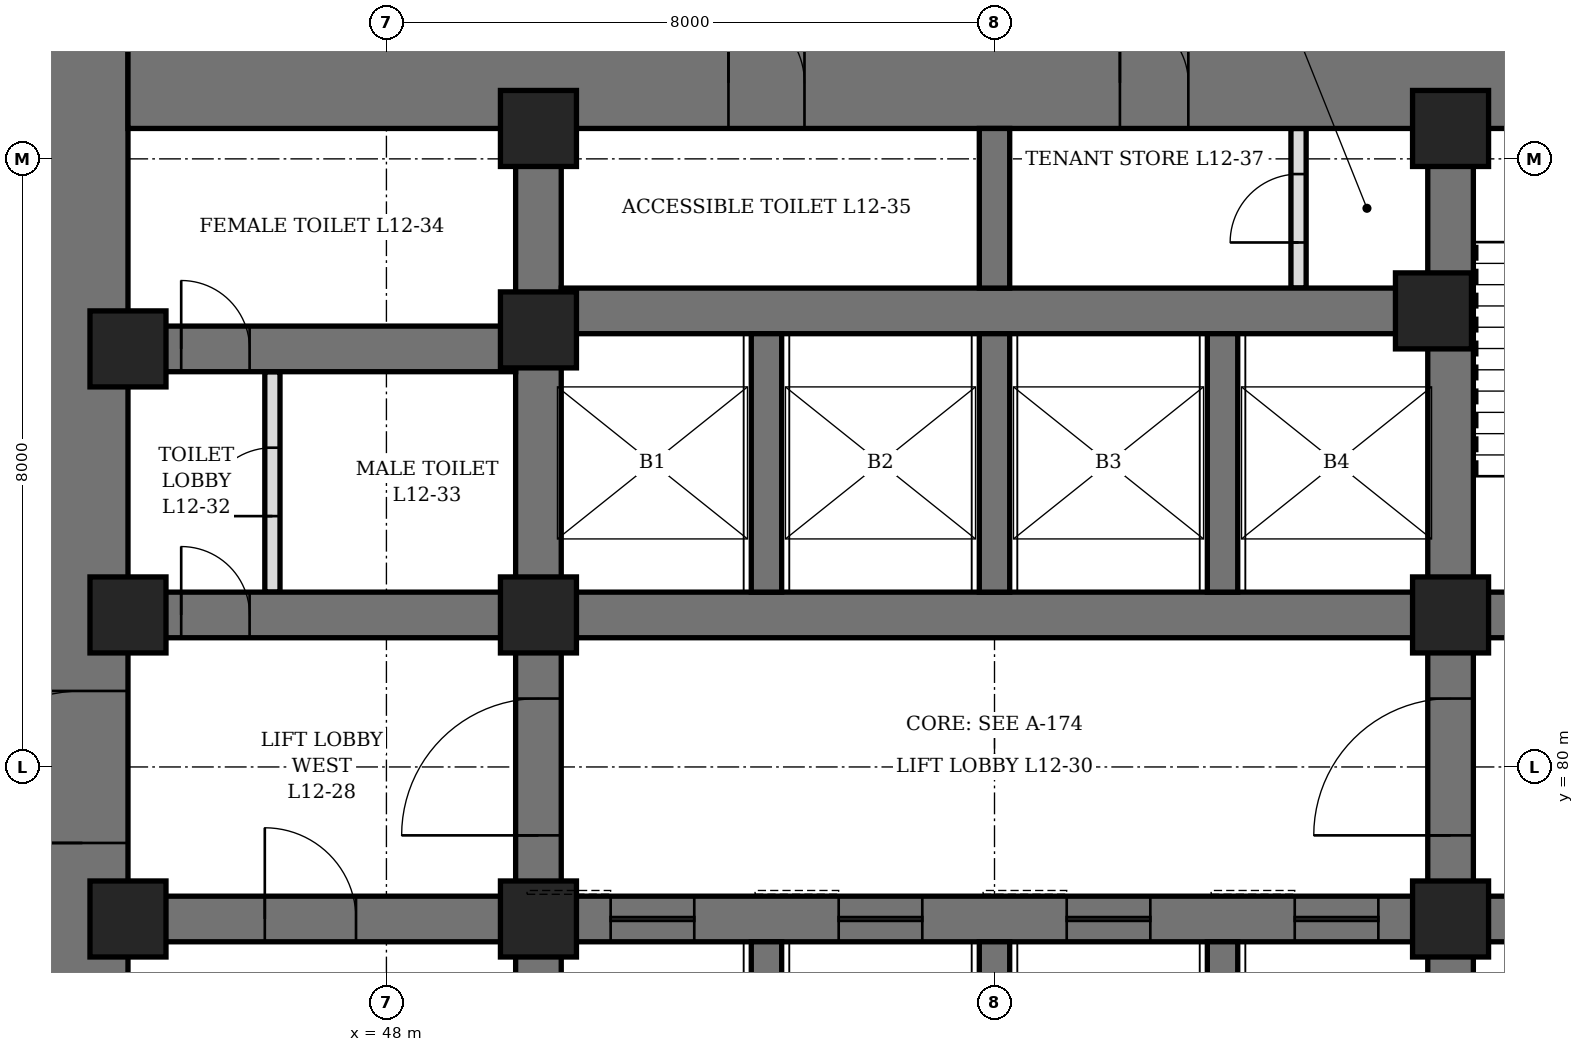
"""IFC4 building model, lengths in metres.
Left out: names, types, materials, properties, quantities, classifications, styles, units other than length and angle.
Written with IfcOpenShell. Run it as: python <this file> out.ifc"""

import sys

from ifc_helpers import new_model, si_unit, direction, frame, frame_2d, origin, origin_2d, place, context, subcontext, project, spatial, rectangle, hollow_rectangle, extrude, element, fill, save


model = new_model("IFC4")
c1 = context("Model", 3, precision=1e-05, world=origin(), true_north=direction((0.0, 1.0)))
c2 = subcontext(c1, "Body", "Model", "MODEL_VIEW")
j1 = project(units=[si_unit("LENGTHUNIT", "METRE"), si_unit("PLANEANGLEUNIT", "RADIAN")], contexts=[c1])
p1 = place(None, origin())
s1 = spatial("IfcSite", under=j1, at=p1, CompositionType="ELEMENT")
p2 = place(p1, origin())
s2 = spatial("IfcBuilding", under=s1, at=p2, CompositionType="ELEMENT")
p3 = place(p2, frame((0.0, 0.0, 60.1)))
s3 = spatial("IfcBuildingStorey", under=s2, at=p3, CompositionType="ELEMENT", Elevation=60.1)
p4 = place(p3, frame((44.0, 70.4, 0.0), z_axis=(0.0, 0.0, 1.0), x_axis=(0.0, 1.0, 0.0)))
e1 = element("IfcWall", 1, at=p4, inside=s3, PredefinedType="SHEAR", context=c2, shape_type="SweptSolid", body=[
    extrude(rectangle(XDim=19.2, YDim=1.2, at=frame_2d((9.6, 0.0))), origin(), (0.0, 0.0, 1.0), 4.2),
])
p5 = place(p4, frame((8.6, 0.0, 0.0)))
e2 = element("IfcOpeningElement", 2, at=p5, cuts=e1, PredefinedType="OPENING", context=c2, shape_type="SweptSolid", body=[
    extrude(rectangle(XDim=2.0, YDim=2.4, at=frame_2d((1.0, 1.2))), frame((0.0, 0.61, 0.0), z_axis=(0.0, -1.0, 0.0), x_axis=(1.0, 0.0, 0.0)), (0.0, 0.0, 1.0), 1.22),
])
p6 = place(p3, frame((44.6, 89.0, 0.0), z_axis=(0.0, 0.0, 1.0), x_axis=(1.0, 0.0, 0.0)))
e3 = element("IfcWall", 3, at=p6, inside=s3, PredefinedType="SHEAR", context=c2, shape_type="SweptSolid", body=[
    extrude(rectangle(XDim=22.8, YDim=1.2, at=frame_2d((11.4, 0.0))), origin(), (0.0, 0.0, 1.0), 4.2),
])
p7 = place(p6, frame((7.9, 0.0, 0.0)))
e4 = element("IfcOpeningElement", 4, at=p7, cuts=e3, PredefinedType="OPENING", context=c2, shape_type="SweptSolid", body=[
    extrude(rectangle(XDim=1.0, YDim=2.1, at=frame_2d((0.5, 1.05))), frame((0.0, 0.61, 0.0), z_axis=(0.0, -1.0, 0.0), x_axis=(1.0, 0.0, 0.0)), (0.0, 0.0, 1.0), 1.22),
])
p8 = place(p6, frame((13.05, 0.0, 0.0)))
e5 = element("IfcOpeningElement", 5, at=p8, cuts=e3, PredefinedType="OPENING", context=c2, shape_type="SweptSolid", body=[
    extrude(rectangle(XDim=0.9, YDim=2.1, at=frame_2d((0.45, 1.05))), frame((0.0, 0.61, 0.0), z_axis=(0.0, -1.0, 0.0), x_axis=(1.0, 0.0, 0.0)), (0.0, 0.0, 1.0), 1.22),
])
p9 = place(p3, frame((50.0, 71.6, 0.0), z_axis=(0.0, 0.0, 1.0), x_axis=(0.0, 1.0, 0.0)))
e6 = element("IfcWall", 6, at=p9, inside=s3, PredefinedType="SHEAR", context=c2, shape_type="SweptSolid", body=[
    extrude(rectangle(XDim=16.8, YDim=0.6, at=frame_2d((8.4, 0.0))), origin(), (0.0, 0.0, 1.0), 4.2),
])
p10 = place(p9, frame((7.5, 0.0, 0.0)))
e7 = element("IfcOpeningElement", 7, at=p10, cuts=e6, PredefinedType="OPENING", context=c2, shape_type="SweptSolid", body=[
    extrude(rectangle(XDim=1.8, YDim=2.4, at=frame_2d((0.9, 1.2))), frame((0.0, 0.31, 0.0), z_axis=(0.0, -1.0, 0.0), x_axis=(1.0, 0.0, 0.0)), (0.0, 0.0, 1.0), 0.62),
])
p11 = place(p3, frame((62.0, 71.6, 0.0), z_axis=(0.0, 0.0, 1.0), x_axis=(0.0, 1.0, 0.0)))
e8 = element("IfcWall", 8, at=p11, inside=s3, PredefinedType="SHEAR", context=c2, shape_type="SweptSolid", body=[
    extrude(rectangle(XDim=16.8, YDim=0.6, at=frame_2d((8.4, 0.0))), origin(), (0.0, 0.0, 1.0), 4.2),
])
p12 = place(p11, frame((7.5, 0.0, 0.0)))
e9 = element("IfcOpeningElement", 9, at=p12, cuts=e8, PredefinedType="OPENING", context=c2, shape_type="SweptSolid", body=[
    extrude(rectangle(XDim=1.8, YDim=2.4, at=frame_2d((0.9, 1.2))), frame((0.0, 0.31, 0.0), z_axis=(0.0, -1.0, 0.0), x_axis=(1.0, 0.0, 0.0)), (0.0, 0.0, 1.0), 0.62),
])
p13 = place(p3, frame((44.6, 78.0, 0.0), z_axis=(0.0, 0.0, 1.0), x_axis=(1.0, 0.0, 0.0)))
e10 = element("IfcWall", 10, at=p13, inside=s3, PredefinedType="SHEAR", context=c2, shape_type="SweptSolid", body=[
    extrude(rectangle(XDim=5.1, YDim=0.6, at=frame_2d((2.55, 0.0))), origin(), (0.0, 0.0, 1.0), 4.2),
])
p14 = place(p13, frame((1.8, 0.0, 0.0)))
e11 = element("IfcOpeningElement", 11, at=p14, cuts=e10, PredefinedType="OPENING", context=c2, shape_type="SweptSolid", body=[
    extrude(rectangle(XDim=1.2, YDim=2.1, at=frame_2d((0.6, 1.05))), frame((0.0, 0.31, 0.0), z_axis=(0.0, -1.0, 0.0), x_axis=(1.0, 0.0, 0.0)), (0.0, 0.0, 1.0), 0.62),
])
p15 = place(p3, frame((44.6, 82.0, 0.0), z_axis=(0.0, 0.0, 1.0), x_axis=(1.0, 0.0, 0.0)))
e12 = element("IfcWall", 12, at=p15, inside=s3, PredefinedType="SHEAR", context=c2, shape_type="SweptSolid", body=[
    extrude(rectangle(XDim=5.1, YDim=0.6, at=frame_2d((2.55, 0.0))), origin(), (0.0, 0.0, 1.0), 4.2),
])
p16 = place(p15, frame((0.7, 0.0, 0.0)))
e13 = element("IfcOpeningElement", 13, at=p16, cuts=e12, PredefinedType="OPENING", context=c2, shape_type="SweptSolid", body=[
    extrude(rectangle(XDim=0.9, YDim=2.1, at=frame_2d((0.45, 1.05))), frame((0.0, 0.31, 0.0), z_axis=(0.0, -1.0, 0.0), x_axis=(1.0, 0.0, 0.0)), (0.0, 0.0, 1.0), 0.62),
])
p17 = place(p3, frame((44.6, 85.5, 0.0), z_axis=(0.0, 0.0, 1.0), x_axis=(1.0, 0.0, 0.0)))
e14 = element("IfcWall", 14, at=p17, inside=s3, PredefinedType="SHEAR", context=c2, shape_type="SweptSolid", body=[
    extrude(rectangle(XDim=5.1, YDim=0.6, at=frame_2d((2.55, 0.0))), origin(), (0.0, 0.0, 1.0), 4.2),
])
p18 = place(p17, frame((0.7, 0.0, 0.0)))
e15 = element("IfcOpeningElement", 15, at=p18, cuts=e14, PredefinedType="OPENING", context=c2, shape_type="SweptSolid", body=[
    extrude(rectangle(XDim=0.9, YDim=2.1, at=frame_2d((0.45, 1.05))), frame((0.0, 0.31, 0.0), z_axis=(0.0, -1.0, 0.0), x_axis=(1.0, 0.0, 0.0)), (0.0, 0.0, 1.0), 0.62),
])
p19 = place(p3, frame((62.3, 78.0, 0.0), z_axis=(0.0, 0.0, 1.0), x_axis=(1.0, 0.0, 0.0)))
e16 = element("IfcWall", 16, at=p19, inside=s3, PredefinedType="SHEAR", context=c2, shape_type="SweptSolid", body=[
    extrude(rectangle(XDim=5.1, YDim=0.6, at=frame_2d((2.55, 0.0))), origin(), (0.0, 0.0, 1.0), 4.2),
])
p20 = place(p19, frame((2.1, 0.0, 0.0)))
e17 = element("IfcOpeningElement", 17, at=p20, cuts=e16, PredefinedType="OPENING", context=c2, shape_type="SweptSolid", body=[
    extrude(rectangle(XDim=1.2, YDim=2.1, at=frame_2d((0.6, 1.05))), frame((0.0, 0.31, 0.0), z_axis=(0.0, -1.0, 0.0), x_axis=(1.0, 0.0, 0.0)), (0.0, 0.0, 1.0), 0.62),
])
p21 = place(p3, frame((62.3, 82.0, 0.0), z_axis=(0.0, 0.0, 1.0), x_axis=(1.0, 0.0, 0.0)))
e18 = element("IfcWall", 18, at=p21, inside=s3, PredefinedType="SHEAR", context=c2, shape_type="SweptSolid", body=[
    extrude(rectangle(XDim=5.1, YDim=0.6, at=frame_2d((2.55, 0.0))), origin(), (0.0, 0.0, 1.0), 4.2),
])
p22 = place(p21, frame((2.1, 0.0, 0.0)))
e19 = element("IfcOpeningElement", 19, at=p22, cuts=e18, PredefinedType="OPENING", context=c2, shape_type="SweptSolid", body=[
    extrude(rectangle(XDim=1.2, YDim=2.1, at=frame_2d((0.6, 1.05))), frame((0.0, 0.31, 0.0), z_axis=(0.0, -1.0, 0.0), x_axis=(1.0, 0.0, 0.0)), (0.0, 0.0, 1.0), 0.62),
])
p23 = place(p3, frame((50.3, 78.0, 0.0), z_axis=(0.0, 0.0, 1.0), x_axis=(1.0, 0.0, 0.0)))
e20 = element("IfcWall", 20, at=p23, inside=s3, PredefinedType="SHEAR", context=c2, shape_type="SweptSolid", body=[
    extrude(rectangle(XDim=11.4, YDim=0.6, at=frame_2d((5.7, 0.0))), origin(), (0.0, 0.0, 1.0), 4.2),
])
p24 = place(p23, frame((0.65, 0.0, 0.0)))
e21 = element("IfcOpeningElement", 21, at=p24, cuts=e20, PredefinedType="OPENING", context=c2, shape_type="SweptSolid", body=[
    extrude(rectangle(XDim=1.1, YDim=2.2, at=frame_2d((0.55, 1.1))), frame((0.0, 0.31, 0.0), z_axis=(0.0, -1.0, 0.0), x_axis=(1.0, 0.0, 0.0)), (0.0, 0.0, 1.0), 0.62),
])
p25 = place(p23, frame((3.65, 0.0, 0.0)))
e22 = element("IfcOpeningElement", 22, at=p25, cuts=e20, PredefinedType="OPENING", context=c2, shape_type="SweptSolid", body=[
    extrude(rectangle(XDim=1.1, YDim=2.2, at=frame_2d((0.55, 1.1))), frame((0.0, 0.31, 0.0), z_axis=(0.0, -1.0, 0.0), x_axis=(1.0, 0.0, 0.0)), (0.0, 0.0, 1.0), 0.62),
])
p26 = place(p23, frame((6.65, 0.0, 0.0)))
e23 = element("IfcOpeningElement", 23, at=p26, cuts=e20, PredefinedType="OPENING", context=c2, shape_type="SweptSolid", body=[
    extrude(rectangle(XDim=1.1, YDim=2.2, at=frame_2d((0.55, 1.1))), frame((0.0, 0.31, 0.0), z_axis=(0.0, -1.0, 0.0), x_axis=(1.0, 0.0, 0.0)), (0.0, 0.0, 1.0), 0.62),
])
p27 = place(p23, frame((9.65, 0.0, 0.0)))
e24 = element("IfcOpeningElement", 24, at=p27, cuts=e20, PredefinedType="OPENING", context=c2, shape_type="SweptSolid", body=[
    extrude(rectangle(XDim=1.1, YDim=2.2, at=frame_2d((0.55, 1.1))), frame((0.0, 0.31, 0.0), z_axis=(0.0, -1.0, 0.0), x_axis=(1.0, 0.0, 0.0)), (0.0, 0.0, 1.0), 0.62),
])
for number, where, z_axis, x_axis in (
    (25, (50.3, 82.0, 0.0), (0.0, 0.0, 1.0), (1.0, 0.0, 0.0)),
    (26, (50.3, 86.0, 0.0), (0.0, 0.0, 1.0), (1.0, 0.0, 0.0)),
):
    element("IfcWall", number, at=place(p3, frame(where, z_axis=z_axis, x_axis=x_axis)), inside=s3, PredefinedType="SHEAR", context=c2, shape_type="SweptSolid", body=[
        extrude(rectangle(XDim=11.4, YDim=0.6, at=frame_2d((5.7, 0.0))), origin(), (0.0, 0.0, 1.0), 4.2),
    ])
p28 = place(p3, frame((53.0, 74.2, 0.0), z_axis=(0.0, 0.0, 1.0), x_axis=(0.0, 1.0, 0.0)))
e27 = element("IfcWall", 27, at=p28, inside=s3, PredefinedType="SHEAR", context=c2, shape_type="SweptSolid", body=[
    extrude(rectangle(XDim=3.5, YDim=0.4, at=frame_2d((1.75, 0.0))), origin(), (0.0, 0.0, 1.0), 4.2),
])
p29 = place(p3, frame((53.0, 82.3, 0.0), z_axis=(0.0, 0.0, 1.0), x_axis=(0.0, 1.0, 0.0)))
e28 = element("IfcWall", 28, at=p29, inside=s3, PredefinedType="SHEAR", context=c2, shape_type="SweptSolid", body=[
    extrude(rectangle(XDim=3.4, YDim=0.4, at=frame_2d((1.7, 0.0))), origin(), (0.0, 0.0, 1.0), 4.2),
])
p30 = place(p3, frame((56.0, 74.2, 0.0), z_axis=(0.0, 0.0, 1.0), x_axis=(0.0, 1.0, 0.0)))
e29 = element("IfcWall", 29, at=p30, inside=s3, PredefinedType="SHEAR", context=c2, shape_type="SweptSolid", body=[
    extrude(rectangle(XDim=3.5, YDim=0.4, at=frame_2d((1.75, 0.0))), origin(), (0.0, 0.0, 1.0), 4.2),
])
p31 = place(p3, frame((56.0, 82.3, 0.0), z_axis=(0.0, 0.0, 1.0), x_axis=(0.0, 1.0, 0.0)))
e30 = element("IfcWall", 30, at=p31, inside=s3, PredefinedType="SHEAR", context=c2, shape_type="SweptSolid", body=[
    extrude(rectangle(XDim=3.4, YDim=0.4, at=frame_2d((1.7, 0.0))), origin(), (0.0, 0.0, 1.0), 4.2),
])
p32 = place(p3, frame((59.0, 74.2, 0.0), z_axis=(0.0, 0.0, 1.0), x_axis=(0.0, 1.0, 0.0)))
e31 = element("IfcWall", 31, at=p32, inside=s3, PredefinedType="SHEAR", context=c2, shape_type="SweptSolid", body=[
    extrude(rectangle(XDim=3.5, YDim=0.4, at=frame_2d((1.75, 0.0))), origin(), (0.0, 0.0, 1.0), 4.2),
])
p33 = place(p3, frame((59.0, 82.3, 0.0), z_axis=(0.0, 0.0, 1.0), x_axis=(0.0, 1.0, 0.0)))
e32 = element("IfcWall", 32, at=p33, inside=s3, PredefinedType="SHEAR", context=c2, shape_type="SweptSolid", body=[
    extrude(rectangle(XDim=3.4, YDim=0.4, at=frame_2d((1.7, 0.0))), origin(), (0.0, 0.0, 1.0), 4.2),
])
p34 = place(p3, frame((56.0, 86.3, 0.0), z_axis=(0.0, 0.0, 1.0), x_axis=(0.0, 1.0, 0.0)))
e33 = element("IfcWall", 33, at=p34, inside=s3, PredefinedType="SHEAR", context=c2, shape_type="SweptSolid", body=[
    extrude(rectangle(XDim=2.1, YDim=0.4, at=frame_2d((1.05, 0.0))), origin(), (0.0, 0.0, 1.0), 4.2),
])
for number, where, z_axis, x_axis in (
    (34, (44.6, 78.0, 0.0), (0.0, 0.0, 1.0), (1.0, 0.0, 0.0)),
    (35, (44.6, 82.0, 0.0), (0.0, 0.0, 1.0), (1.0, 0.0, 0.0)),
    (36, (44.6, 85.5, 0.0), (0.0, 0.0, 1.0), (1.0, 0.0, 0.0)),
    (37, (50.0, 78.0, 0.0), (0.0, 0.0, 1.0), (1.0, 0.0, 0.0)),
    (38, (50.0, 82.0, 0.0), (0.0, 0.0, 1.0), (1.0, 0.0, 0.0)),
    (39, (50.0, 85.75, 0.0), (0.0, 0.0, 1.0), (1.0, 0.0, 0.0)),
    (40, (50.0, 88.4, 0.0), (0.0, 0.0, 1.0), (1.0, 0.0, 0.0)),
    (41, (61.775, 86.0, 0.0), (0.0, 0.0, 1.0), (1.0, 0.0, 0.0)),
    (42, (62.0, 78.0, 0.0), (0.0, 0.0, 1.0), (1.0, 0.0, 0.0)),
    (43, (62.0, 82.0, 0.0), (0.0, 0.0, 1.0), (1.0, 0.0, 0.0)),
    (44, (62.0, 88.4, 0.0), (0.0, 0.0, 1.0), (1.0, 0.0, 0.0)),
):
    element("IfcColumn", number, at=place(p3, frame(where, z_axis=z_axis, x_axis=x_axis)), inside=s3, PredefinedType="COLUMN", context=c2, shape_type="SweptSolid", body=[
        extrude(hollow_rectangle(XDim=1.0, YDim=1.0, WallThickness=0.15, at=origin_2d()), origin(), (0.0, 0.0, 1.0), 4.2),
    ])
p35 = place(p3, frame((46.5, 82.3, 0.0), z_axis=(0.0, 0.0, 1.0), x_axis=(0.0, 1.0, 0.0)))
e45 = element("IfcWall", 45, at=p35, inside=s3, PredefinedType="PARTITIONING", context=c2, shape_type="SweptSolid", body=[
    extrude(rectangle(XDim=2.9, YDim=0.2, at=frame_2d((1.45, 0.0))), origin(), (0.0, 0.0, 1.0), 4.04),
])
p36 = place(p35, frame((1.0, 0.0, 0.0)))
e46 = element("IfcOpeningElement", 46, at=p36, cuts=e45, PredefinedType="OPENING", context=c2, shape_type="SweptSolid", body=[
    extrude(rectangle(XDim=0.9, YDim=2.1, at=frame_2d((0.45, 1.05))), frame((0.0, 0.11, 0.0), z_axis=(0.0, -1.0, 0.0), x_axis=(1.0, 0.0, 0.0)), (0.0, 0.0, 1.0), 0.22),
])
p37 = place(p3, frame((60.0, 86.3, 0.0), z_axis=(0.0, 0.0, 1.0), x_axis=(0.0, 1.0, 0.0)))
e47 = element("IfcWall", 47, at=p37, inside=s3, PredefinedType="PARTITIONING", context=c2, shape_type="SweptSolid", body=[
    extrude(rectangle(XDim=2.1, YDim=0.2, at=frame_2d((1.05, 0.0))), origin(), (0.0, 0.0, 1.0), 4.04),
])
p38 = place(p37, frame((0.6, 0.0, 0.0)))
e48 = element("IfcOpeningElement", 48, at=p38, cuts=e47, PredefinedType="OPENING", context=c2, shape_type="SweptSolid", body=[
    extrude(rectangle(XDim=0.9, YDim=2.1, at=frame_2d((0.45, 1.05))), frame((0.0, 0.11, 0.0), z_axis=(0.0, -1.0, 0.0), x_axis=(1.0, 0.0, 0.0)), (0.0, 0.0, 1.0), 0.22),
])
p39 = place(p16, origin())
e49 = element("IfcDoor", 49, at=p39, inside=s3, OperationType="SINGLE_SWING_LEFT", PredefinedType="DOOR", context=c2, shape_type="SweptSolid", body=[
    extrude(rectangle(XDim=0.9, YDim=2.1, at=frame_2d((0.45, 1.05))), frame((0.0, 0.3, 0.0), z_axis=(0.0, -1.0, 0.0), x_axis=(1.0, 0.0, 0.0)), (0.0, 0.0, 1.0), 0.6),
])
fill(e13, e49)
p40 = place(p36, origin())
e50 = element("IfcDoor", 50, at=p40, inside=s3, OperationType="SINGLE_SWING_RIGHT", PredefinedType="DOOR", context=c2, shape_type="SweptSolid", body=[
    extrude(rectangle(XDim=0.9, YDim=2.1, at=frame_2d((0.45, 1.05))), frame((0.0, 0.1, 0.0), z_axis=(0.0, -1.0, 0.0), x_axis=(1.0, 0.0, 0.0)), (0.0, 0.0, 1.0), 0.199),
])
fill(e46, e50)
p41 = place(p18, origin())
e51 = element("IfcDoor", 51, at=p41, inside=s3, OperationType="SINGLE_SWING_RIGHT", PredefinedType="DOOR", context=c2, shape_type="SweptSolid", body=[
    extrude(rectangle(XDim=0.9, YDim=2.1, at=frame_2d((0.45, 1.05))), frame((0.0, 0.3, 0.0), z_axis=(0.0, -1.0, 0.0), x_axis=(1.0, 0.0, 0.0)), (0.0, 0.0, 1.0), 0.6),
])
fill(e15, e51)
p42 = place(p7, origin())
e52 = element("IfcDoor", 52, at=p42, inside=s3, OperationType="SINGLE_SWING_LEFT", PredefinedType="DOOR", context=c2, shape_type="SweptSolid", body=[
    extrude(rectangle(XDim=1.0, YDim=2.1, at=frame_2d((0.5, 1.05))), frame((0.0, 0.35, 0.0), z_axis=(0.0, -1.0, 0.0), x_axis=(1.0, 0.0, 0.0)), (0.0, 0.0, 1.0), 0.7),
])
fill(e4, e52)
p43 = place(p8, origin())
e53 = element("IfcDoor", 53, at=p43, inside=s3, OperationType="SINGLE_SWING_LEFT", PredefinedType="DOOR", context=c2, shape_type="SweptSolid", body=[
    extrude(rectangle(XDim=0.9, YDim=2.1, at=frame_2d((0.45, 1.05))), frame((0.0, 0.35, 0.0), z_axis=(0.0, -1.0, 0.0), x_axis=(1.0, 0.0, 0.0)), (0.0, 0.0, 1.0), 0.7),
])
fill(e5, e53)
p44 = place(p38, origin())
e54 = element("IfcDoor", 54, at=p44, inside=s3, OperationType="SINGLE_SWING_LEFT", PredefinedType="DOOR", context=c2, shape_type="SweptSolid", body=[
    extrude(rectangle(XDim=0.9, YDim=2.1, at=frame_2d((0.45, 1.05))), frame((0.0, 0.1, 0.0), z_axis=(0.0, -1.0, 0.0), x_axis=(1.0, 0.0, 0.0)), (0.0, 0.0, 1.0), 0.199),
])
fill(e48, e54)
p45 = place(p14, origin())
e55 = element("IfcDoor", 55, at=p45, inside=s3, OperationType="SINGLE_SWING_LEFT", PredefinedType="DOOR", context=c2, shape_type="SweptSolid", body=[
    extrude(rectangle(XDim=1.2, YDim=2.1, at=frame_2d((0.6, 1.05))), frame((0.0, 0.3, 0.0), z_axis=(0.0, -1.0, 0.0), x_axis=(1.0, 0.0, 0.0)), (0.0, 0.0, 1.0), 0.6),
])
fill(e11, e55)
p46 = place(p5, origin())
e56 = element("IfcDoor", 56, at=p46, inside=s3, OperationType="DOUBLE_DOOR_SINGLE_SWING", PredefinedType="DOOR", context=c2, shape_type="SweptSolid", body=[
    extrude(rectangle(XDim=2.0, YDim=2.4, at=frame_2d((1.0, 1.2))), frame((0.0, 0.35, 0.0), z_axis=(0.0, -1.0, 0.0), x_axis=(1.0, 0.0, 0.0)), (0.0, 0.0, 1.0), 0.7),
])
fill(e2, e56)
p47 = place(p10, origin())
e57 = element("IfcDoor", 57, at=p47, inside=s3, OperationType="DOUBLE_DOOR_SINGLE_SWING", PredefinedType="DOOR", context=c2, shape_type="SweptSolid", body=[
    extrude(rectangle(XDim=1.8, YDim=2.4, at=frame_2d((0.9, 1.2))), frame((0.0, 0.3, 0.0), z_axis=(0.0, -1.0, 0.0), x_axis=(1.0, 0.0, 0.0)), (0.0, 0.0, 1.0), 0.6),
])
fill(e7, e57)
p48 = place(p12, origin())
e58 = element("IfcDoor", 58, at=p48, inside=s3, OperationType="DOUBLE_DOOR_SINGLE_SWING", PredefinedType="DOOR", context=c2, shape_type="SweptSolid", body=[
    extrude(rectangle(XDim=1.8, YDim=2.4, at=frame_2d((0.9, 1.2))), frame((0.0, 0.3, 0.0), z_axis=(0.0, -1.0, 0.0), x_axis=(1.0, 0.0, 0.0)), (0.0, 0.0, 1.0), 0.6),
])
fill(e9, e58)
p49 = place(p24, origin())
e59 = element("IfcDoor", 59, at=p49, inside=s3, OperationType="SLIDING_TO_LEFT", PredefinedType="DOOR", context=c2, shape_type="SweptSolid", body=[
    extrude(rectangle(XDim=1.1, YDim=2.2, at=frame_2d((0.55, 1.1))), frame((0.0, 0.3, 0.0), z_axis=(0.0, -1.0, 0.0), x_axis=(1.0, 0.0, 0.0)), (0.0, 0.0, 1.0), 0.6),
])
fill(e21, e59)
p50 = place(p25, origin())
e60 = element("IfcDoor", 60, at=p50, inside=s3, OperationType="SLIDING_TO_LEFT", PredefinedType="DOOR", context=c2, shape_type="SweptSolid", body=[
    extrude(rectangle(XDim=1.1, YDim=2.2, at=frame_2d((0.55, 1.1))), frame((0.0, 0.3, 0.0), z_axis=(0.0, -1.0, 0.0), x_axis=(1.0, 0.0, 0.0)), (0.0, 0.0, 1.0), 0.6),
])
fill(e22, e60)
p51 = place(p26, origin())
e61 = element("IfcDoor", 61, at=p51, inside=s3, OperationType="SLIDING_TO_LEFT", PredefinedType="DOOR", context=c2, shape_type="SweptSolid", body=[
    extrude(rectangle(XDim=1.1, YDim=2.2, at=frame_2d((0.55, 1.1))), frame((0.0, 0.3, 0.0), z_axis=(0.0, -1.0, 0.0), x_axis=(1.0, 0.0, 0.0)), (0.0, 0.0, 1.0), 0.6),
])
fill(e23, e61)
p52 = place(p27, origin())
e62 = element("IfcDoor", 62, at=p52, inside=s3, OperationType="SLIDING_TO_LEFT", PredefinedType="DOOR", context=c2, shape_type="SweptSolid", body=[
    extrude(rectangle(XDim=1.1, YDim=2.2, at=frame_2d((0.55, 1.1))), frame((0.0, 0.3, 0.0), z_axis=(0.0, -1.0, 0.0), x_axis=(1.0, 0.0, 0.0)), (0.0, 0.0, 1.0), 0.6),
])
fill(e24, e62)
save(model, sys.argv[1])
